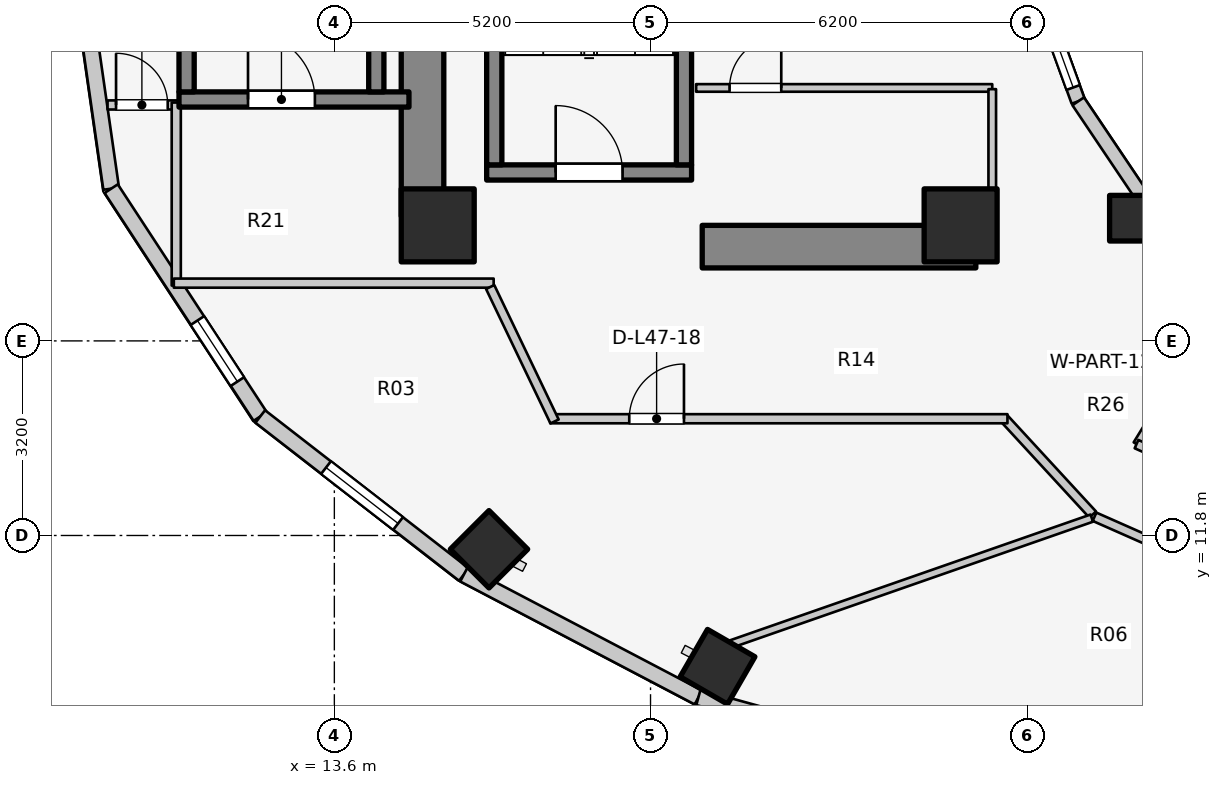
"""IFC4 building model, lengths in metres.
Left out: names, types, materials, properties, quantities, classifications, styles, units other than length and angle.
Written with IfcOpenShell. Run it as: python <this file> out.ifc"""

import sys

from ifc_helpers import new_model, si_unit, direction, frame, frame_2d, origin, origin_2d, place, context, subcontext, project, spatial, rectangle, extrude, element, fill, save


model = new_model("IFC4")
c1 = context("Model", 3, precision=1e-05, world=origin(), true_north=direction((0.0, 1.0)))
c2 = subcontext(c1, "Body", "Model", "MODEL_VIEW")
j1 = project(units=[si_unit("LENGTHUNIT", "METRE"), si_unit("PLANEANGLEUNIT", "RADIAN")], contexts=[c1])
p1 = place(None, origin())
s1 = spatial("IfcSite", under=j1, at=p1, CompositionType="ELEMENT")
p2 = place(p1, origin())
s2 = spatial("IfcBuilding", under=s1, at=p2, CompositionType="ELEMENT")
p3 = place(p2, frame((0.0, 0.0, 156.0)))
s3 = spatial("IfcBuildingStorey", under=s2, at=p3, CompositionType="ELEMENT", Elevation=156.0)
p4 = place(p3, frame((15.05, 17.05, 0.0), z_axis=(0.0, 0.0, 1.0), x_axis=(0.0, 1.0, 0.0)))
e1 = element("IfcWall", 1, at=p4, inside=s3, PredefinedType="SHEAR", context=c2, shape_type="SweptSolid", body=[
    extrude(rectangle(XDim=12.8, YDim=0.7, at=frame_2d((6.4, 0.0))), origin(), (0.0, 0.0, 1.0), 3.1),
])
p5 = place(p3, frame((19.65, 16.55, 0.0), z_axis=(0.0, 0.0, 1.0), x_axis=(1.0, 0.0, 0.0)))
e2 = element("IfcWall", 2, at=p5, inside=s3, PredefinedType="SHEAR", context=c2, shape_type="SweptSolid", body=[
    extrude(rectangle(XDim=4.5, YDim=0.7, at=frame_2d((2.25, 0.0))), origin(), (0.0, 0.0, 1.0), 3.1),
])
p6 = place(p3, frame((16.105, 17.77, 0.0), z_axis=(0.0, 0.0, 1.0), x_axis=(1.0, 0.0, 0.0)))
e3 = element("IfcWall", 3, at=p6, inside=s3, PredefinedType="SOLIDWALL", context=c2, shape_type="SweptSolid", body=[
    extrude(rectangle(XDim=3.37, YDim=0.25, at=frame_2d((1.685, 0.0))), origin(), (0.0, 0.0, 1.0), 3.1),
])
p7 = place(p6, frame((1.135, 0.0, 0.0)))
e4 = element("IfcOpeningElement", 4, at=p7, cuts=e3, PredefinedType="OPENING", context=c2, shape_type="SweptSolid", body=[
    extrude(rectangle(XDim=1.1, YDim=2.1, at=frame_2d((0.55, 1.05))), frame((0.0, 0.135, 0.0), z_axis=(0.0, -1.0, 0.0), x_axis=(1.0, 0.0, 0.0)), (0.0, 0.0, 1.0), 0.27),
])
for number, where, z_axis, x_axis in (
    (5, (16.23, 17.895, 0.0), (0.0, 0.0, 1.0), (0.0, 1.0, 0.0)),
    (6, (19.35, 17.895, 0.0), (0.0, 0.0, 1.0), (0.0, 1.0, 0.0)),
):
    element("IfcWall", number, at=place(p3, frame(where, z_axis=z_axis, x_axis=x_axis)), inside=s3, PredefinedType="SOLIDWALL", context=c2, shape_type="SweptSolid", body=[
        extrude(rectangle(XDim=7.81, YDim=0.25, at=frame_2d((3.905, 0.0))), origin(), (0.0, 0.0, 1.0), 3.1),
    ])
p8 = place(p3, frame((11.045, 18.97, 0.0), z_axis=(0.0, 0.0, 1.0), x_axis=(1.0, 0.0, 0.0)))
e7 = element("IfcWall", 7, at=p8, inside=s3, PredefinedType="SOLIDWALL", context=c2, shape_type="SweptSolid", body=[
    extrude(rectangle(XDim=3.782, YDim=0.25, at=frame_2d((1.891, 0.0))), origin(), (0.0, 0.0, 1.0), 3.1),
])
p9 = place(p8, frame((1.135, 0.0, 0.0)))
e8 = element("IfcOpeningElement", 8, at=p9, cuts=e7, PredefinedType="OPENING", context=c2, shape_type="SweptSolid", body=[
    extrude(rectangle(XDim=1.1, YDim=2.1, at=frame_2d((0.55, 1.05))), frame((0.0, 0.135, 0.0), z_axis=(0.0, -1.0, 0.0), x_axis=(1.0, 0.0, 0.0)), (0.0, 0.0, 1.0), 0.27),
])
for number, where, z_axis, x_axis in (
    (9, (11.17, 19.095, 0.0), (0.0, 0.0, 1.0), (0.0, 1.0, 0.0)),
    (10, (14.29, 19.095, 0.0), (0.0, 0.0, 1.0), (0.0, 1.0, 0.0)),
):
    element("IfcWall", number, at=place(p3, frame(where, z_axis=z_axis, x_axis=x_axis)), inside=s3, PredefinedType="SOLIDWALL", context=c2, shape_type="SweptSolid", body=[
        extrude(rectangle(XDim=7.81, YDim=0.25, at=frame_2d((3.905, 0.0))), origin(), (0.0, 0.0, 1.0), 3.1),
    ])
for number, where, z_axis, x_axis in (
    (11, (15.3, 16.9, 0.0), (0.0, 0.0, 1.0), (1.0, 0.0, 0.0)),
    (12, (23.9, 16.9, 0.0), (0.0, 0.0, 1.0), (1.0, 0.0, 0.0)),
):
    element("IfcColumn", number, at=place(p3, frame(where, z_axis=z_axis, x_axis=x_axis)), inside=s3, PredefinedType="COLUMN", context=c2, shape_type="SweptSolid", body=[
        extrude(rectangle(XDim=1.2, YDim=1.2, at=origin_2d()), origin(), (0.0, 0.0, 1.0), 3.1),
    ])
p10 = place(p3, frame((26.725, 17.018, 0.0), z_axis=(0.0, 0.0, 1.0), x_axis=(1.0, 0.0, 0.0)))
e13 = element("IfcColumn", 13, at=p10, inside=s3, PredefinedType="COLUMN", context=c2, shape_type="SweptSolid", body=[
    extrude(rectangle(XDim=0.75, YDim=0.75, at=origin_2d()), origin(), (0.0, 0.0, 1.0), 3.1),
])
for number, where, z_axis, x_axis in (
    (14, (16.143, 11.573, 0.0), (0.0, 0.0, 1.0), (-0.707, -0.707, 0.0)),
    (15, (19.902, 9.641, 0.0), (0.0, 0.0, 1.0), (-0.5, -0.866, 0.0)),
):
    element("IfcColumn", number, at=place(p3, frame(where, z_axis=z_axis, x_axis=x_axis)), inside=s3, PredefinedType="COLUMN", context=c2, shape_type="SweptSolid", body=[
        extrude(rectangle(XDim=0.9, YDim=0.9, at=origin_2d()), origin(), (0.0, 0.0, 1.0), 3.1),
    ])
p11 = place(p3, frame((25.123, 20.898, 0.0), z_axis=(0.0, 0.0, 1.0), x_axis=(0.341423187295, -0.93990968033, 0.0)))
e16 = element("IfcWall", 16, at=p11, inside=s3, PredefinedType="STANDARD", context=c2, shape_type="SweptSolid", body=[
    extrude(rectangle(XDim=2.084, YDim=0.23, at=frame_2d((1.042, 0.0))), origin(), (0.0, 0.0, 1.0), 2.84),
])
p12 = place(p11, frame((0.242, 0.0, 0.85)))
e17 = element("IfcOpeningElement", 17, at=p12, cuts=e16, PredefinedType="OPENING", context=c2, shape_type="SweptSolid", body=[
    extrude(rectangle(XDim=1.6, YDim=1.65, at=frame_2d((0.8, 0.825))), frame((0.0, 0.125, 0.0), z_axis=(0.0, -1.0, 0.0), x_axis=(1.0, 0.0, 0.0)), (0.0, 0.0, 1.0), 0.25),
])
p13 = place(p3, frame((25.834, 18.94, 0.0), z_axis=(0.0, 0.0, 1.0), x_axis=(0.558197800898, -0.829707909492, 0.0)))
e18 = element("IfcWall", 18, at=p13, inside=s3, PredefinedType="STANDARD", context=c2, shape_type="SweptSolid", body=[
    extrude(rectangle(XDim=2.027, YDim=0.23, at=frame_2d((1.013, 0.0))), origin(), (0.0, 0.0, 1.0), 2.16),
])
p14 = place(p3, frame((9.14, 23.0, 0.0), z_axis=(0.0, 0.0, 1.0), x_axis=(0.142227632286, -0.989833976288, 0.0)))
e19 = element("IfcWall", 19, at=p14, inside=s3, PredefinedType="STANDARD", context=c2, shape_type="SweptSolid", body=[
    extrude(rectangle(XDim=5.553, YDim=0.26, at=frame_2d((2.776, 0.0))), origin(), (0.0, 0.0, 1.0), 2.85),
])
p15 = place(p14, frame((1.506, 0.0, 0.75)))
e20 = element("IfcOpeningElement", 20, at=p15, cuts=e19, PredefinedType="OPENING", context=c2, shape_type="SweptSolid", body=[
    extrude(rectangle(XDim=1.2, YDim=1.5, at=frame_2d((0.6, 0.75))), frame((0.0, 0.14, 0.0), z_axis=(0.0, -1.0, 0.0), x_axis=(1.0, 0.0, 0.0)), (0.0, 0.0, 1.0), 0.28),
])
p16 = place(p3, frame((9.93, 17.503, 0.0), z_axis=(0.0, 0.0, 1.0), x_axis=(0.547456494366, -0.836834145322, 0.0)))
e21 = element("IfcWall", 21, at=p16, inside=s3, PredefinedType="STANDARD", context=c2, shape_type="SweptSolid", body=[
    extrude(rectangle(XDim=4.477, YDim=0.26, at=frame_2d((2.239, 0.0))), origin(), (0.0, 0.0, 1.0), 2.85),
])
p17 = place(p16, frame((2.591, 0.0, 0.75)))
e22 = element("IfcOpeningElement", 22, at=p17, cuts=e21, PredefinedType="OPENING", context=c2, shape_type="SweptSolid", body=[
    extrude(rectangle(XDim=1.2, YDim=1.5, at=frame_2d((0.6, 0.75))), frame((0.0, 0.14, 0.0), z_axis=(0.0, -1.0, 0.0), x_axis=(1.0, 0.0, 0.0)), (0.0, 0.0, 1.0), 0.28),
])
p18 = place(p3, frame((12.381, 13.757, 0.0), z_axis=(0.0, 0.0, 1.0), x_axis=(0.790185650662, -0.612867552973, 0.0)))
e23 = element("IfcWall", 23, at=p18, inside=s3, PredefinedType="STANDARD", context=c2, shape_type="SweptSolid", body=[
    extrude(rectangle(XDim=4.239, YDim=0.26, at=frame_2d((2.12, 0.0))), origin(), (0.0, 0.0, 1.0), 2.85),
])
p19 = place(p18, frame((1.37, 0.0, 0.75)))
e24 = element("IfcOpeningElement", 24, at=p19, cuts=e23, PredefinedType="OPENING", context=c2, shape_type="SweptSolid", body=[
    extrude(rectangle(XDim=1.5, YDim=1.6, at=frame_2d((0.75, 0.8))), frame((0.0, 0.14, 0.0), z_axis=(0.0, -1.0, 0.0), x_axis=(1.0, 0.0, 0.0)), (0.0, 0.0, 1.0), 0.28),
])
p20 = place(p3, frame((15.731, 11.158, 0.0), z_axis=(0.0, 0.0, 1.0), x_axis=(0.885660265226, -0.464333818065, 0.0)))
e25 = element("IfcWall", 25, at=p20, inside=s3, PredefinedType="STANDARD", context=c2, shape_type="SweptSolid", body=[
    extrude(rectangle(XDim=4.354, YDim=0.26, at=frame_2d((2.177, 0.0))), origin(), (0.0, 0.0, 1.0), 2.85),
])
p21 = place(p3, frame((19.587, 9.137, 0.0), z_axis=(0.0, 0.0, 1.0), x_axis=(0.963953455704, -0.26607092144, 0.0)))
e26 = element("IfcWall", 26, at=p21, inside=s3, PredefinedType="STANDARD", context=c2, shape_type="SweptSolid", body=[
    extrude(rectangle(XDim=5.237, YDim=0.26, at=frame_2d((2.618, 0.0))), origin(), (0.0, 0.0, 1.0), 2.85),
])
p22 = place(p21, frame((1.418, 0.0, 0.75)))
e27 = element("IfcOpeningElement", 27, at=p22, cuts=e26, PredefinedType="OPENING", context=c2, shape_type="SweptSolid", body=[
    extrude(rectangle(XDim=2.4, YDim=1.7, at=frame_2d((1.2, 0.85))), frame((0.0, 0.14, 0.0), z_axis=(0.0, -1.0, 0.0), x_axis=(1.0, 0.0, 0.0)), (0.0, 0.0, 1.0), 0.28),
])
p23 = place(p3, frame((19.55, 19.16, 0.0), z_axis=(0.0, 0.0, 1.0), x_axis=(1.0, 0.0, 0.0)))
e28 = element("IfcWall", 28, at=p23, inside=s3, PredefinedType="PARTITIONING", context=c2, shape_type="SweptSolid", body=[
    extrude(rectangle(XDim=4.87, YDim=0.125, at=frame_2d((2.435, 0.0))), origin(), (0.0, 0.0, 1.0), 2.12),
])
p24 = place(p23, frame((0.55, 0.0, 0.0)))
e29 = element("IfcOpeningElement", 29, at=p24, cuts=e28, PredefinedType="OPENING", context=c2, shape_type="SweptSolid", body=[
    extrude(rectangle(XDim=0.85, YDim=2.05, at=frame_2d((0.425, 1.025))), frame((0.0, 0.073, 0.0), z_axis=(0.0, -1.0, 0.0), x_axis=(1.0, 0.0, 0.0)), (0.0, 0.0, 1.0), 0.145),
])
p25 = place(p3, frame((24.42, 17.1, 0.0), z_axis=(0.0, 0.0, 1.0), x_axis=(0.0, 1.0, 0.0)))
e30 = element("IfcWall", 30, at=p25, inside=s3, PredefinedType="PARTITIONING", context=c2, shape_type="SweptSolid", body=[
    extrude(rectangle(XDim=2.04, YDim=0.125, at=frame_2d((1.02, 0.0))), origin(), (0.0, 0.0, 1.0), 2.232),
])
p26 = place(p3, frame((9.87, 18.88, 0.0), z_axis=(0.0, 0.0, 1.0), x_axis=(1.0, 0.0, 0.0)))
e31 = element("IfcWall", 31, at=p26, inside=s3, PredefinedType="PARTITIONING", context=c2, shape_type="SweptSolid", body=[
    extrude(rectangle(XDim=1.17, YDim=0.15, at=frame_2d((0.585, 0.0))), origin(), (0.0, 0.0, 1.0), 2.855),
])
p27 = place(p26, frame((0.14, 0.0, 0.0)))
e32 = element("IfcOpeningElement", 32, at=p27, cuts=e31, PredefinedType="OPENING", context=c2, shape_type="SweptSolid", body=[
    extrude(rectangle(XDim=0.85, YDim=2.05, at=frame_2d((0.425, 1.025))), frame((0.0, 0.085, 0.0), z_axis=(0.0, -1.0, 0.0), x_axis=(1.0, 0.0, 0.0)), (0.0, 0.0, 1.0), 0.17),
])
p28 = place(p3, frame((11.0, 15.91, 0.0), z_axis=(0.0, 0.0, 1.0), x_axis=(0.0, 1.0, 0.0)))
e33 = element("IfcWall", 33, at=p28, inside=s3, PredefinedType="PARTITIONING", context=c2, shape_type="SweptSolid", body=[
    extrude(rectangle(XDim=3.01, YDim=0.15, at=frame_2d((1.505, 0.0))), origin(), (0.0, 0.0, 1.0), 2.855),
])
p29 = place(p3, frame((10.96, 15.95, 0.0), z_axis=(0.0, 0.0, 1.0), x_axis=(1.0, 0.0, 0.0)))
e34 = element("IfcWall", 34, at=p29, inside=s3, PredefinedType="PARTITIONING", context=c2, shape_type="SweptSolid", body=[
    extrude(rectangle(XDim=5.26, YDim=0.15, at=frame_2d((2.63, 0.0))), origin(), (0.0, 0.0, 1.0), 2.22),
])
p30 = place(p3, frame((26.072, 12.144, 0.0), z_axis=(0.0, 0.0, 1.0), x_axis=(-0.677579737957, 0.735449317567, 0.0)))
e35 = element("IfcWall", 35, at=p30, inside=s3, PredefinedType="PARTITIONING", context=c2, shape_type="SweptSolid", body=[
    extrude(rectangle(XDim=2.173, YDim=0.15, at=frame_2d((1.086, 0.0))), origin(), (0.0, 0.0, 1.0), 2.299),
])
p31 = place(p3, frame((17.15, 13.72, 0.0), z_axis=(0.0, 0.0, 1.0), x_axis=(1.0, 0.0, 0.0)))
e36 = element("IfcWall", 36, at=p31, inside=s3, PredefinedType="PARTITIONING", context=c2, shape_type="SweptSolid", body=[
    extrude(rectangle(XDim=7.52, YDim=0.15, at=frame_2d((3.76, 0.0))), origin(), (0.0, 0.0, 1.0), 2.299),
])
p32 = place(p31, frame((1.3, 0.0, 0.0)))
e37 = element("IfcOpeningElement", 37, at=p32, cuts=e36, PredefinedType="OPENING", context=c2, shape_type="SweptSolid", body=[
    extrude(rectangle(XDim=0.9, YDim=2.1, at=frame_2d((0.45, 1.05))), frame((0.0, 0.085, 0.0), z_axis=(0.0, -1.0, 0.0), x_axis=(1.0, 0.0, 0.0)), (0.0, 0.0, 1.0), 0.17),
])
p33 = place(p3, frame((17.222, 13.675, 0.0), z_axis=(0.0, 0.0, 1.0), x_axis=(-0.431973389813, 0.901886351207, 0.0)))
e38 = element("IfcWall", 38, at=p33, inside=s3, PredefinedType="PARTITIONING", context=c2, shape_type="SweptSolid", body=[
    extrude(rectangle(XDim=2.452, YDim=0.15, at=frame_2d((1.226, 0.0))), origin(), (0.0, 0.0, 1.0), 2.855),
])
p34 = place(p3, frame((28.45, 15.985, 0.0), z_axis=(0.0, 0.0, 1.0), x_axis=(-0.523587550846, -0.851971875474, 0.0)))
e39 = element("IfcWall", 39, at=p34, inside=s3, PredefinedType="PARTITIONING", context=c2, shape_type="SweptSolid", body=[
    extrude(rectangle(XDim=3.153, YDim=0.125, at=frame_2d((1.577, 0.0))), origin(), (0.0, 0.0, 1.0), 2.299),
])
p35 = place(p3, frame((26.793, 13.303, 0.0), z_axis=(0.0, 0.0, 1.0), x_axis=(0.913145536541, -0.407633694749, 0.0)))
e40 = element("IfcWall", 40, at=p35, inside=s3, PredefinedType="PARTITIONING", context=c2, shape_type="SweptSolid", body=[
    extrude(rectangle(XDim=2.756, YDim=0.15, at=frame_2d((1.378, 0.0))), origin(), (0.0, 0.0, 1.0), 2.299),
])
p36 = place(p3, frame((26.057, 12.086, 0.0), z_axis=(0.0, 0.0, 1.0), x_axis=(-0.944182779284, -0.329422038278, 0.0)))
e41 = element("IfcWall", 41, at=p36, inside=s3, PredefinedType="PARTITIONING", context=c2, shape_type="SweptSolid", body=[
    extrude(rectangle(XDim=6.291, YDim=0.125, at=frame_2d((3.146, 0.0))), origin(), (0.0, 0.0, 1.0), 2.299),
])
p37 = place(p3, frame((26.102, 12.108, 0.0), z_axis=(0.0, 0.0, 1.0), x_axis=(0.914519212393, -0.40454247016, 0.0)))
e42 = element("IfcWall", 42, at=p37, inside=s3, PredefinedType="PARTITIONING", context=c2, shape_type="SweptSolid", body=[
    extrude(rectangle(XDim=3.124, YDim=0.15, at=frame_2d((1.562, 0.0))), origin(), (0.0, 0.0, 1.0), 2.299),
])
p38 = place(p12, origin())
e43 = element("IfcWindow", 43, at=p38, inside=s3, PartitioningType="SINGLE_PANEL", PredefinedType="WINDOW", context=c2, shape_type="SweptSolid", body=[
    extrude(rectangle(XDim=1.6, YDim=1.65, at=frame_2d((0.8, 0.825))), frame((0.0, 0.03, 0.0), z_axis=(0.0, -1.0, 0.0), x_axis=(1.0, 0.0, 0.0)), (0.0, 0.0, 1.0), 0.06),
])
fill(e17, e43)
p39 = place(p17, origin())
e44 = element("IfcWindow", 44, at=p39, inside=s3, PartitioningType="SINGLE_PANEL", PredefinedType="WINDOW", context=c2, shape_type="SweptSolid", body=[
    extrude(rectangle(XDim=1.2, YDim=1.5, at=frame_2d((0.6, 0.75))), frame((0.0, 0.03, 0.0), z_axis=(0.0, -1.0, 0.0), x_axis=(1.0, 0.0, 0.0)), (0.0, 0.0, 1.0), 0.06),
])
fill(e22, e44)
p40 = place(p19, origin())
e45 = element("IfcWindow", 45, at=p40, inside=s3, PartitioningType="SINGLE_PANEL", PredefinedType="WINDOW", context=c2, shape_type="SweptSolid", body=[
    extrude(rectangle(XDim=1.5, YDim=1.6, at=frame_2d((0.75, 0.8))), frame((0.0, 0.03, 0.0), z_axis=(0.0, -1.0, 0.0), x_axis=(1.0, 0.0, 0.0)), (0.0, 0.0, 1.0), 0.06),
])
fill(e24, e45)
p41 = place(p7, origin())
e46 = element("IfcDoor", 46, at=p41, inside=s3, OperationType="SINGLE_SWING_LEFT", PredefinedType="DOOR", context=c2, shape_type="SweptSolid", body=[
    extrude(rectangle(XDim=1.1, YDim=2.1, at=frame_2d((0.55, 1.05))), frame((0.0, 0.025, 0.0), z_axis=(0.0, -1.0, 0.0), x_axis=(1.0, 0.0, 0.0)), (0.0, 0.0, 1.0), 0.05),
])
fill(e4, e46)
p42 = place(p9, origin())
e47 = element("IfcDoor", 47, at=p42, inside=s3, OperationType="SINGLE_SWING_LEFT", PredefinedType="DOOR", context=c2, shape_type="SweptSolid", body=[
    extrude(rectangle(XDim=1.1, YDim=2.1, at=frame_2d((0.55, 1.05))), frame((0.0, 0.025, 0.0), z_axis=(0.0, -1.0, 0.0), x_axis=(1.0, 0.0, 0.0)), (0.0, 0.0, 1.0), 0.05),
])
fill(e8, e47)
p43 = place(p24, origin())
e48 = element("IfcDoor", 48, at=p43, inside=s3, OperationType="SINGLE_SWING_RIGHT", PredefinedType="DOOR", context=c2, shape_type="SweptSolid", body=[
    extrude(rectangle(XDim=0.85, YDim=2.05, at=frame_2d((0.425, 1.025))), frame((0.0, 0.025, 0.0), z_axis=(0.0, -1.0, 0.0), x_axis=(1.0, 0.0, 0.0)), (0.0, 0.0, 1.0), 0.05),
])
fill(e29, e48)
p44 = place(p27, origin())
e49 = element("IfcDoor", 49, at=p44, inside=s3, OperationType="SINGLE_SWING_LEFT", PredefinedType="DOOR", context=c2, shape_type="SweptSolid", body=[
    extrude(rectangle(XDim=0.85, YDim=2.05, at=frame_2d((0.425, 1.025))), frame((0.0, 0.025, 0.0), z_axis=(0.0, -1.0, 0.0), x_axis=(1.0, 0.0, 0.0)), (0.0, 0.0, 1.0), 0.05),
])
fill(e32, e49)
p45 = place(p32, origin())
e50 = element("IfcDoor", 50, at=p45, inside=s3, OperationType="SINGLE_SWING_RIGHT", PredefinedType="DOOR", context=c2, shape_type="SweptSolid", body=[
    extrude(rectangle(XDim=0.9, YDim=2.1, at=frame_2d((0.45, 1.05))), frame((0.0, 0.025, 0.0), z_axis=(0.0, -1.0, 0.0), x_axis=(1.0, 0.0, 0.0)), (0.0, 0.0, 1.0), 0.05),
])
fill(e37, e50)
save(model, sys.argv[1])
